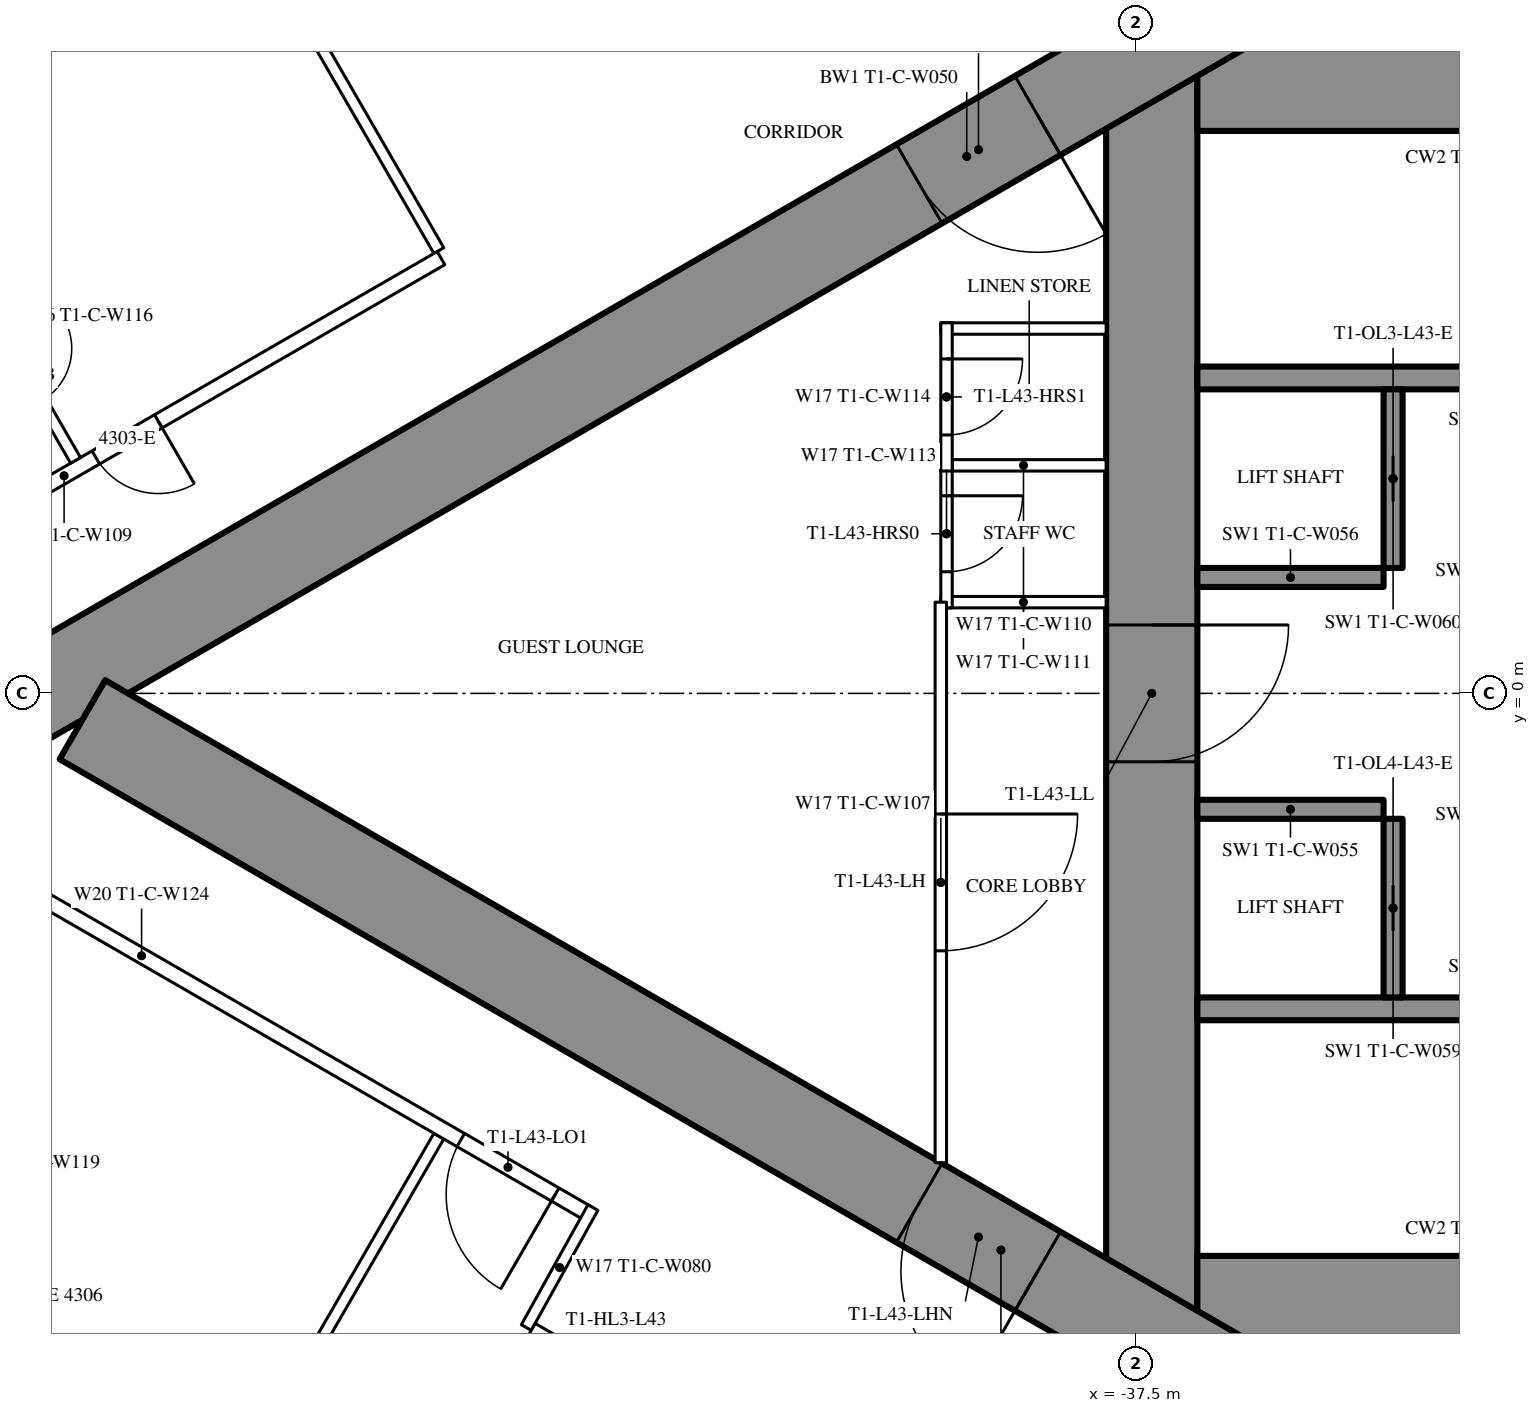
"""IFC4 building model, lengths in metres.
Left out: names, types, materials, properties, quantities, classifications, styles, units other than length and angle.
Written with IfcOpenShell. Run it as: python <this file> out.ifc"""

import sys

from ifc_helpers import new_model, si_unit, direction, frame, frame_2d, origin, place, context, subcontext, project, spatial, rectangle, extrude, element, fill, save


model = new_model("IFC4")
c1 = context("Model", 3, precision=1e-05, world=origin(), true_north=direction((0.0, 1.0)))
c2 = subcontext(c1, "Body", "Model", "MODEL_VIEW")
j1 = project(units=[si_unit("LENGTHUNIT", "METRE"), si_unit("PLANEANGLEUNIT", "RADIAN")], contexts=[c1])
p1 = place(None, origin())
s1 = spatial("IfcSite", under=j1, at=p1, CompositionType="ELEMENT")
p2 = place(p1, origin())
s2 = spatial("IfcBuilding", under=s1, at=p2, CompositionType="ELEMENT")
p3 = place(p2, frame((0.0, 0.0, 163.3)))
s3 = spatial("IfcBuildingStorey", under=s2, at=p3, CompositionType="ELEMENT", Elevation=163.3)
p4 = place(p3, frame((-37.3, 8.6, 0.0), z_axis=(0.0, 0.0, 1.0), x_axis=(0.0, -1.0, 0.0)))
e1 = element("IfcWall", 1, at=p4, inside=s3, PredefinedType="SHEAR", context=c2, shape_type="SweptSolid", body=[
    extrude(rectangle(XDim=17.2, YDim=1.2, at=frame_2d((8.6, 0.0))), origin(), (0.0, 0.0, 1.0), 3.5),
])
p5 = place(p4, frame((7.7, 0.0, 0.0)))
e2 = element("IfcOpeningElement", 2, at=p5, cuts=e1, PredefinedType="OPENING", context=c2, shape_type="SweptSolid", body=[
    extrude(rectangle(XDim=1.8, YDim=2.2, at=frame_2d((0.9, 1.1))), frame((0.0, 0.61, 0.0), z_axis=(0.0, -1.0, 0.0), x_axis=(1.0, 0.0, 0.0)), (0.0, 0.0, 1.0), 1.22),
])
p6 = place(p3, frame((-28.3, 8.0, 0.0), z_axis=(0.0, 0.0, 1.0), x_axis=(-1.0, 0.0, 0.0)))
e3 = element("IfcWall", 3, at=p6, inside=s3, PredefinedType="SHEAR", context=c2, shape_type="SweptSolid", body=[
    extrude(rectangle(XDim=8.4, YDim=1.2, at=frame_2d((4.2, 0.0))), origin(), (0.0, 0.0, 1.0), 3.5),
])
p7 = place(p6, frame((0.25, 0.0, 0.0)))
e4 = element("IfcOpeningElement", 4, at=p7, cuts=e3, PredefinedType="OPENING", context=c2, shape_type="SweptSolid", body=[
    extrude(rectangle(XDim=1.0, YDim=2.2, at=frame_2d((0.5, 1.1))), frame((0.0, 0.61, 0.0), z_axis=(0.0, -1.0, 0.0), x_axis=(1.0, 0.0, 0.0)), (0.0, 0.0, 1.0), 1.22),
])
p8 = place(p3, frame((-28.3, -8.0, 0.0), z_axis=(0.0, 0.0, 1.0), x_axis=(-1.0, 0.0, 0.0)))
e5 = element("IfcWall", 5, at=p8, inside=s3, PredefinedType="SHEAR", context=c2, shape_type="SweptSolid", body=[
    extrude(rectangle(XDim=8.4, YDim=1.2, at=frame_2d((4.2, 0.0))), origin(), (0.0, 0.0, 1.0), 3.5),
])
p9 = place(p8, frame((0.25, 0.0, 0.0)))
e6 = element("IfcOpeningElement", 6, at=p9, cuts=e5, PredefinedType="OPENING", context=c2, shape_type="SweptSolid", body=[
    extrude(rectangle(XDim=1.0, YDim=2.2, at=frame_2d((0.5, 1.1))), frame((0.0, 0.61, 0.0), z_axis=(0.0, -1.0, 0.0), x_axis=(1.0, 0.0, 0.0)), (0.0, 0.0, 1.0), 1.22),
])
for number, where, z_axis, x_axis in (
    (7, (-28.3, 4.15, 0.0), (0.0, 0.0, 1.0), (-1.0, 0.0, 0.0)),
    (8, (-28.3, -4.15, 0.0), (0.0, 0.0, 1.0), (-1.0, 0.0, 0.0)),
):
    element("IfcWall", number, at=place(p3, frame(where, z_axis=z_axis, x_axis=x_axis)), inside=s3, PredefinedType="SHEAR", context=c2, shape_type="SweptSolid", body=[
        extrude(rectangle(XDim=8.4, YDim=0.3, at=frame_2d((4.2, 0.0))), origin(), (0.0, 0.0, 1.0), 3.5),
    ])
p10 = place(p3, frame((-34.125, 4.0, 0.0), z_axis=(0.0, 0.0, 1.0), x_axis=(0.0, -1.0, 0.0)))
e9 = element("IfcWall", 9, at=p10, inside=s3, PredefinedType="SHEAR", context=c2, shape_type="SweptSolid", body=[
    extrude(rectangle(XDim=2.35, YDim=0.25, at=frame_2d((1.175, 0.0))), origin(), (0.0, 0.0, 1.0), 3.5),
])
p11 = place(p10, frame((0.875, 0.0, 0.0)))
e10 = element("IfcOpeningElement", 10, at=p11, cuts=e9, PredefinedType="OPENING", context=c2, shape_type="SweptSolid", body=[
    extrude(rectangle(XDim=0.6, YDim=2.0, at=frame_2d((0.3, 1.0))), frame((0.0, 0.135, 0.0), z_axis=(0.0, -1.0, 0.0), x_axis=(1.0, 0.0, 0.0)), (0.0, 0.0, 1.0), 0.27),
])
p12 = place(p3, frame((-34.25, 1.525, 0.0), z_axis=(0.0, 0.0, 1.0), x_axis=(-1.0, 0.0, 0.0)))
e11 = element("IfcWall", 11, at=p12, inside=s3, PredefinedType="SHEAR", context=c2, shape_type="SweptSolid", body=[
    extrude(rectangle(XDim=2.45, YDim=0.25, at=frame_2d((1.225, 0.0))), origin(), (0.0, 0.0, 1.0), 3.5),
])
p13 = place(p3, frame((-34.125, -1.65, 0.0), z_axis=(0.0, 0.0, 1.0), x_axis=(0.0, -1.0, 0.0)))
e12 = element("IfcWall", 12, at=p13, inside=s3, PredefinedType="SHEAR", context=c2, shape_type="SweptSolid", body=[
    extrude(rectangle(XDim=2.35, YDim=0.25, at=frame_2d((1.175, 0.0))), origin(), (0.0, 0.0, 1.0), 3.5),
])
p14 = place(p13, frame((0.875, 0.0, 0.0)))
e13 = element("IfcOpeningElement", 13, at=p14, cuts=e12, PredefinedType="OPENING", context=c2, shape_type="SweptSolid", body=[
    extrude(rectangle(XDim=0.6, YDim=2.0, at=frame_2d((0.3, 1.0))), frame((0.0, 0.135, 0.0), z_axis=(0.0, -1.0, 0.0), x_axis=(1.0, 0.0, 0.0)), (0.0, 0.0, 1.0), 0.27),
])
p15 = place(p3, frame((-34.25, -1.525, 0.0), z_axis=(0.0, 0.0, 1.0), x_axis=(-1.0, 0.0, 0.0)))
e14 = element("IfcWall", 14, at=p15, inside=s3, PredefinedType="SHEAR", context=c2, shape_type="SweptSolid", body=[
    extrude(rectangle(XDim=2.45, YDim=0.25, at=frame_2d((1.225, 0.0))), origin(), (0.0, 0.0, 1.0), 3.5),
])
p16 = place(p3, frame((-27.2, 14.3, 0.0), z_axis=(0.0, 0.0, 1.0), x_axis=(-0.866026593062, -0.499997940104, 0.0)))
e15 = element("IfcWall", 15, at=p16, inside=s3, PredefinedType="SHEAR", context=c2, shape_type="SweptSolid", body=[
    extrude(rectangle(XDim=28.946, YDim=1.2, at=frame_2d((14.473, 0.0))), origin(), (0.0, 0.0, 1.0), 3.5),
])
p17 = place(p16, frame((4.6, 0.0, 0.0)))
e16 = element("IfcOpeningElement", 16, at=p17, cuts=e15, PredefinedType="OPENING", context=c2, shape_type="SweptSolid", body=[
    extrude(rectangle(XDim=1.0, YDim=2.2, at=frame_2d((0.5, 1.1))), frame((0.0, 0.61, 0.0), z_axis=(0.0, -1.0, 0.0), x_axis=(1.0, 0.0, 0.0)), (0.0, 0.0, 1.0), 1.22),
])
p18 = place(p16, frame((13.395, 0.0, 0.0)))
e17 = element("IfcOpeningElement", 17, at=p18, cuts=e15, PredefinedType="OPENING", context=c2, shape_type="SweptSolid", body=[
    extrude(rectangle(XDim=1.8, YDim=2.2, at=frame_2d((0.9, 1.1))), frame((0.0, 0.61, 0.0), z_axis=(0.0, -1.0, 0.0), x_axis=(1.0, 0.0, 0.0)), (0.0, 0.0, 1.0), 1.22),
])
p19 = place(p3, frame((-27.2, -14.3, 0.0), z_axis=(0.0, 0.0, 1.0), x_axis=(-0.866024021859, 0.500002393557, 0.0)))
e18 = element("IfcWall", 18, at=p19, inside=s3, PredefinedType="SHEAR", context=c2, shape_type="SweptSolid", body=[
    extrude(rectangle(XDim=27.907, YDim=1.2, at=frame_2d((13.954, 0.0))), origin(), (0.0, 0.0, 1.0), 3.5),
])
p20 = place(p19, frame((4.6, 0.0, 0.0)))
e19 = element("IfcOpeningElement", 19, at=p20, cuts=e18, PredefinedType="OPENING", context=c2, shape_type="SweptSolid", body=[
    extrude(rectangle(XDim=1.0, YDim=2.2, at=frame_2d((0.5, 1.1))), frame((0.0, 0.61, 0.0), z_axis=(0.0, -1.0, 0.0), x_axis=(1.0, 0.0, 0.0)), (0.0, 0.0, 1.0), 1.22),
])
p21 = place(p19, frame((13.395, 0.0, 0.0)))
e20 = element("IfcOpeningElement", 20, at=p21, cuts=e18, PredefinedType="OPENING", context=c2, shape_type="SweptSolid", body=[
    extrude(rectangle(XDim=1.8, YDim=2.2, at=frame_2d((0.9, 1.1))), frame((0.0, 0.61, 0.0), z_axis=(0.0, -1.0, 0.0), x_axis=(1.0, 0.0, 0.0)), (0.0, 0.0, 1.0), 1.22),
])
for number, where, z_axis, x_axis in (
    (21, (-46.679, 5.825, 0.0), (0.0, 0.0, 1.0), (-0.5, 0.866, 0.0)),
    (22, (-46.679, -5.825, 0.0), (0.0, 0.0, 1.0), (-0.5, -0.866, 0.0)),
):
    element("IfcWall", number, at=place(p3, frame(where, z_axis=z_axis, x_axis=x_axis)), inside=s3, PredefinedType="PARTITIONING", context=c2, shape_type="SweptSolid", body=[
        extrude(rectangle(XDim=6.911, YDim=0.15, at=frame_2d((3.456, 0.0))), origin(), (0.0, 0.0, 1.0), 2.3),
    ])
p22 = place(p3, frame((-44.715, -6.844, 0.0), z_axis=(0.0, 0.0, 1.0), x_axis=(-0.866025261224, 0.500000246922, 0.0)))
e23 = element("IfcWall", 23, at=p22, inside=s3, PredefinedType="PARTITIONING", context=c2, shape_type="SweptSolid", body=[
    extrude(rectangle(XDim=13.567, YDim=0.2, at=frame_2d((6.783, 0.0))), origin(), (0.0, 0.0, 1.0), 3.25),
])
p23 = place(p22, frame((10.579, 0.0, 0.0)))
e24 = element("IfcOpeningElement", 24, at=p23, cuts=e23, PredefinedType="OPENING", context=c2, shape_type="SweptSolid", body=[
    extrude(rectangle(XDim=0.95, YDim=2.2, at=frame_2d((0.475, 1.1))), frame((0.0, 0.11, 0.0), z_axis=(0.0, -1.0, 0.0), x_axis=(1.0, 0.0, 0.0)), (0.0, 0.0, 1.0), 0.22),
])
p24 = place(p22, frame((8.879, 0.0, 0.0)))
e25 = element("IfcOpeningElement", 25, at=p24, cuts=e23, PredefinedType="OPENING", context=c2, shape_type="SweptSolid", body=[
    extrude(rectangle(XDim=0.95, YDim=2.2, at=frame_2d((0.475, 1.1))), frame((0.0, 0.11, 0.0), z_axis=(0.0, -1.0, 0.0), x_axis=(1.0, 0.0, 0.0)), (0.0, 0.0, 1.0), 0.22),
])
p25 = place(p22, frame((0.5, 0.0, 0.0)))
e26 = element("IfcOpeningElement", 26, at=p25, cuts=e23, PredefinedType="OPENING", context=c2, shape_type="SweptSolid", body=[
    extrude(rectangle(XDim=1.435, YDim=2.2, at=frame_2d((0.718, 1.1))), frame((0.0, 0.11, 0.0), z_axis=(0.0, -1.0, 0.0), x_axis=(1.0, 0.0, 0.0)), (0.0, 0.0, 1.0), 0.22),
])
p26 = place(p3, frame((-44.652, -6.764, 0.0), z_axis=(0.0, 0.0, 1.0), x_axis=(-0.485424724123, -0.874278466629, 0.0)))
e27 = element("IfcWall", 27, at=p26, inside=s3, PredefinedType="PARTITIONING", context=c2, shape_type="SweptSolid", body=[
    extrude(rectangle(XDim=1.805, YDim=0.15, at=frame_2d((0.903, 0.0))), origin(), (0.0, 0.0, 1.0), 3.25),
])
p27 = place(p3, frame((-46.65, 5.726, 0.0), z_axis=(0.0, 0.0, 1.0), x_axis=(-0.866027963864, -0.499995565786, 0.0)))
e28 = element("IfcWall", 28, at=p27, inside=s3, PredefinedType="PARTITIONING", context=c2, shape_type="SweptSolid", body=[
    extrude(rectangle(XDim=11.452, YDim=0.2, at=frame_2d((5.726, 0.0))), origin(), (0.0, 0.0, 1.0), 3.25),
])
p28 = place(p27, frame((4.294, 0.0, 0.0)))
e29 = element("IfcOpeningElement", 29, at=p28, cuts=e28, PredefinedType="OPENING", context=c2, shape_type="SweptSolid", body=[
    extrude(rectangle(XDim=0.95, YDim=2.2, at=frame_2d((0.475, 1.1))), frame((0.0, 0.11, 0.0), z_axis=(0.0, -1.0, 0.0), x_axis=(1.0, 0.0, 0.0)), (0.0, 0.0, 1.0), 0.22),
])
p29 = place(p27, frame((8.344, 0.0, 0.0)))
e30 = element("IfcOpeningElement", 30, at=p29, cuts=e28, PredefinedType="OPENING", context=c2, shape_type="SweptSolid", body=[
    extrude(rectangle(XDim=0.95, YDim=2.2, at=frame_2d((0.475, 1.1))), frame((0.0, 0.11, 0.0), z_axis=(0.0, -1.0, 0.0), x_axis=(1.0, 0.0, 0.0)), (0.0, 0.0, 1.0), 0.22),
])
p30 = place(p3, frame((-51.459, 3.065, 0.0), z_axis=(0.0, 0.0, 1.0), x_axis=(-0.499936506574, 0.866062058628, 0.0)))
e31 = element("IfcWall", 31, at=p30, inside=s3, PredefinedType="PARTITIONING", context=c2, shape_type="SweptSolid", body=[
    extrude(rectangle(XDim=2.6, YDim=0.15, at=frame_2d((1.3, 0.0))), origin(), (0.0, 0.0, 1.0), 3.25),
])
p31 = place(p30, frame((0.9, 0.0, 0.0)))
e32 = element("IfcOpeningElement", 32, at=p31, cuts=e31, PredefinedType="OPENING", context=c2, shape_type="SweptSolid", body=[
    extrude(rectangle(XDim=0.8, YDim=2.2, at=frame_2d((0.4, 1.1))), frame((0.0, 0.085, 0.0), z_axis=(0.0, -1.0, 0.0), x_axis=(1.0, 0.0, 0.0)), (0.0, 0.0, 1.0), 0.17),
])
for number, where, z_axis, x_axis in (
    (33, (-37.9, 1.2, 0.0), (0.0, 0.0, 1.0), (-1.0, 0.0, 0.0)),
    (34, (-37.9, 3.0, 0.0), (0.0, 0.0, 1.0), (-1.0, 0.0, 0.0)),
    (35, (-37.9, 4.8, 0.0), (0.0, 0.0, 1.0), (-1.0, 0.0, 0.0)),
):
    element("IfcWall", number, at=place(p3, frame(where, z_axis=z_axis, x_axis=x_axis)), inside=s3, PredefinedType="PARTITIONING", context=c2, shape_type="SweptSolid", body=[
        extrude(rectangle(XDim=2.175, YDim=0.15, at=frame_2d((1.087, 0.0))), origin(), (0.0, 0.0, 1.0), 3.25),
    ])
p32 = place(p3, frame((-40.0, 3.075, 0.0), z_axis=(0.0, 0.0, 1.0), x_axis=(0.0, -1.0, 0.0)))
e36 = element("IfcWall", 36, at=p32, inside=s3, PredefinedType="PARTITIONING", context=c2, shape_type="SweptSolid", body=[
    extrude(rectangle(XDim=1.95, YDim=0.15, at=frame_2d((0.975, 0.0))), origin(), (0.0, 0.0, 1.0), 3.25),
])
p33 = place(p32, frame((0.475, 0.0, 0.0)))
e37 = element("IfcOpeningElement", 37, at=p33, cuts=e36, PredefinedType="OPENING", context=c2, shape_type="SweptSolid", body=[
    extrude(rectangle(XDim=1.0, YDim=2.2, at=frame_2d((0.5, 1.1))), frame((0.0, 0.085, 0.0), z_axis=(0.0, -1.0, 0.0), x_axis=(1.0, 0.0, 0.0)), (0.0, 0.0, 1.0), 0.17),
])
p34 = place(p3, frame((-40.0, 4.875, 0.0), z_axis=(0.0, 0.0, 1.0), x_axis=(0.0, -1.0, 0.0)))
e38 = element("IfcWall", 38, at=p34, inside=s3, PredefinedType="PARTITIONING", context=c2, shape_type="SweptSolid", body=[
    extrude(rectangle(XDim=1.95, YDim=0.15, at=frame_2d((0.975, 0.0))), origin(), (0.0, 0.0, 1.0), 3.25),
])
p35 = place(p34, frame((0.475, 0.0, 0.0)))
e39 = element("IfcOpeningElement", 39, at=p35, cuts=e38, PredefinedType="OPENING", context=c2, shape_type="SweptSolid", body=[
    extrude(rectangle(XDim=1.0, YDim=2.2, at=frame_2d((0.5, 1.1))), frame((0.0, 0.085, 0.0), z_axis=(0.0, -1.0, 0.0), x_axis=(1.0, 0.0, 0.0)), (0.0, 0.0, 1.0), 0.17),
])
p36 = place(p3, frame((-40.075, 1.2, 0.0), z_axis=(0.0, 0.0, 1.0), x_axis=(0.0, -1.0, 0.0)))
e40 = element("IfcWall", 40, at=p36, inside=s3, PredefinedType="PARTITIONING", context=c2, shape_type="SweptSolid", body=[
    extrude(rectangle(XDim=7.374, YDim=0.15, at=frame_2d((3.687, 0.0))), origin(), (0.0, 0.0, 1.0), 3.25),
])
p37 = place(p36, frame((2.787, 0.0, 0.0)))
e41 = element("IfcOpeningElement", 41, at=p37, cuts=e40, PredefinedType="OPENING", context=c2, shape_type="SweptSolid", body=[
    extrude(rectangle(XDim=1.8, YDim=2.2, at=frame_2d((0.9, 1.1))), frame((0.0, 0.085, 0.0), z_axis=(0.0, -1.0, 0.0), x_axis=(1.0, 0.0, 0.0)), (0.0, 0.0, 1.0), 0.17),
])
p38 = place(p3, frame((-39.758, -11.697, 0.0), z_axis=(0.0, 0.0, 1.0), x_axis=(-0.866024194504, 0.500002094529, 0.0)))
e42 = element("IfcWall", 42, at=p38, inside=s3, PredefinedType="PARTITIONING", context=c2, shape_type="SweptSolid", body=[
    extrude(rectangle(XDim=6.6, YDim=0.25, at=frame_2d((3.3, 0.0))), origin(), (0.0, 0.0, 1.0), 3.25),
])
p39 = place(p38, frame((0.75, 0.0, 0.0)))
e43 = element("IfcOpeningElement", 43, at=p39, cuts=e42, PredefinedType="OPENING", context=c2, shape_type="SweptSolid", body=[
    extrude(rectangle(XDim=1.1, YDim=2.2, at=frame_2d((0.55, 1.1))), frame((0.0, 0.135, 0.0), z_axis=(0.0, -1.0, 0.0), x_axis=(1.0, 0.0, 0.0)), (0.0, 0.0, 1.0), 0.27),
])
p40 = place(p38, frame((2.75, 0.0, 0.0)))
e44 = element("IfcOpeningElement", 44, at=p40, cuts=e42, PredefinedType="OPENING", context=c2, shape_type="SweptSolid", body=[
    extrude(rectangle(XDim=1.1, YDim=2.2, at=frame_2d((0.55, 1.1))), frame((0.0, 0.135, 0.0), z_axis=(0.0, -1.0, 0.0), x_axis=(1.0, 0.0, 0.0)), (0.0, 0.0, 1.0), 0.27),
])
p41 = place(p38, frame((4.75, 0.0, 0.0)))
e45 = element("IfcOpeningElement", 45, at=p41, cuts=e42, PredefinedType="OPENING", context=c2, shape_type="SweptSolid", body=[
    extrude(rectangle(XDim=1.1, YDim=2.2, at=frame_2d((0.55, 1.1))), frame((0.0, 0.135, 0.0), z_axis=(0.0, -1.0, 0.0), x_axis=(1.0, 0.0, 0.0)), (0.0, 0.0, 1.0), 0.27),
])
p42 = place(p28, origin())
e46 = element("IfcDoor", 46, at=p42, inside=s3, OperationType="SINGLE_SWING_LEFT", PredefinedType="DOOR", context=c2, shape_type="SweptSolid", body=[
    extrude(rectangle(XDim=0.95, YDim=2.2, at=frame_2d((0.475, 1.1))), frame((0.0, 0.025, 0.0), z_axis=(0.0, -1.0, 0.0), x_axis=(1.0, 0.0, 0.0)), (0.0, 0.0, 1.0), 0.05),
])
fill(e29, e46)
p43 = place(p25, origin())
e47 = element("IfcDoor", 47, at=p43, inside=s3, OperationType="SINGLE_SWING_LEFT", PredefinedType="DOOR", context=c2, shape_type="SweptSolid", body=[
    extrude(rectangle(XDim=1.435, YDim=2.2, at=frame_2d((0.718, 1.1))), frame((0.0, 0.025, 0.0), z_axis=(0.0, -1.0, 0.0), x_axis=(1.0, 0.0, 0.0)), (0.0, 0.0, 1.0), 0.05),
])
fill(e26, e47)
p44 = place(p33, origin())
e48 = element("IfcDoor", 48, at=p44, inside=s3, OperationType="SINGLE_SWING_LEFT", PredefinedType="DOOR", context=c2, shape_type="SweptSolid", body=[
    extrude(rectangle(XDim=1.0, YDim=2.2, at=frame_2d((0.5, 1.1))), frame((0.0, 0.025, 0.0), z_axis=(0.0, -1.0, 0.0), x_axis=(1.0, 0.0, 0.0)), (0.0, 0.0, 1.0), 0.05),
])
fill(e37, e48)
p45 = place(p35, origin())
e49 = element("IfcDoor", 49, at=p45, inside=s3, OperationType="SINGLE_SWING_LEFT", PredefinedType="DOOR", context=c2, shape_type="SweptSolid", body=[
    extrude(rectangle(XDim=1.0, YDim=2.2, at=frame_2d((0.5, 1.1))), frame((0.0, 0.025, 0.0), z_axis=(0.0, -1.0, 0.0), x_axis=(1.0, 0.0, 0.0)), (0.0, 0.0, 1.0), 0.05),
])
fill(e39, e49)
p46 = place(p37, origin())
e50 = element("IfcDoor", 50, at=p46, inside=s3, OperationType="DOUBLE_DOOR_SINGLE_SWING", PredefinedType="DOOR", context=c2, shape_type="SweptSolid", body=[
    extrude(rectangle(XDim=1.8, YDim=2.2, at=frame_2d((0.9, 1.1))), frame((0.0, 0.025, 0.0), z_axis=(0.0, -1.0, 0.0), x_axis=(1.0, 0.0, 0.0)), (0.0, 0.0, 1.0), 0.05),
])
fill(e41, e50)
p47 = place(p18, origin())
e51 = element("IfcDoor", 51, at=p47, inside=s3, OperationType="DOUBLE_DOOR_SINGLE_SWING", PredefinedType="DOOR", context=c2, shape_type="SweptSolid", body=[
    extrude(rectangle(XDim=1.8, YDim=2.2, at=frame_2d((0.9, 1.1))), frame((0.0, 0.025, 0.0), z_axis=(0.0, -1.0, 0.0), x_axis=(1.0, 0.0, 0.0)), (0.0, 0.0, 1.0), 0.05),
])
fill(e17, e51)
p48 = place(p21, origin())
e52 = element("IfcDoor", 52, at=p48, inside=s3, OperationType="DOUBLE_DOOR_SINGLE_SWING", PredefinedType="DOOR", context=c2, shape_type="SweptSolid", body=[
    extrude(rectangle(XDim=1.8, YDim=2.2, at=frame_2d((0.9, 1.1))), frame((0.0, 0.025, 0.0), z_axis=(0.0, -1.0, 0.0), x_axis=(1.0, 0.0, 0.0)), (0.0, 0.0, 1.0), 0.05),
])
fill(e20, e52)
p49 = place(p5, origin())
e53 = element("IfcDoor", 53, at=p49, inside=s3, OperationType="DOUBLE_DOOR_SINGLE_SWING", PredefinedType="DOOR", context=c2, shape_type="SweptSolid", body=[
    extrude(rectangle(XDim=1.8, YDim=2.2, at=frame_2d((0.9, 1.1))), frame((0.0, 0.025, 0.0), z_axis=(0.0, -1.0, 0.0), x_axis=(1.0, 0.0, 0.0)), (0.0, 0.0, 1.0), 0.05),
])
fill(e2, e53)
p50 = place(p11, origin())
e54 = element("IfcDoor", 54, at=p50, inside=s3, OperationType="SLIDING_TO_LEFT", PredefinedType="DOOR", context=c2, shape_type="SweptSolid", body=[
    extrude(rectangle(XDim=0.6, YDim=2.0, at=frame_2d((0.3, 1.0))), frame((0.0, 0.025, 0.0), z_axis=(0.0, -1.0, 0.0), x_axis=(1.0, 0.0, 0.0)), (0.0, 0.0, 1.0), 0.05),
])
fill(e10, e54)
p51 = place(p14, origin())
e55 = element("IfcDoor", 55, at=p51, inside=s3, OperationType="SLIDING_TO_LEFT", PredefinedType="DOOR", context=c2, shape_type="SweptSolid", body=[
    extrude(rectangle(XDim=0.6, YDim=2.0, at=frame_2d((0.3, 1.0))), frame((0.0, 0.025, 0.0), z_axis=(0.0, -1.0, 0.0), x_axis=(1.0, 0.0, 0.0)), (0.0, 0.0, 1.0), 0.05),
])
fill(e13, e55)
save(model, sys.argv[1])
